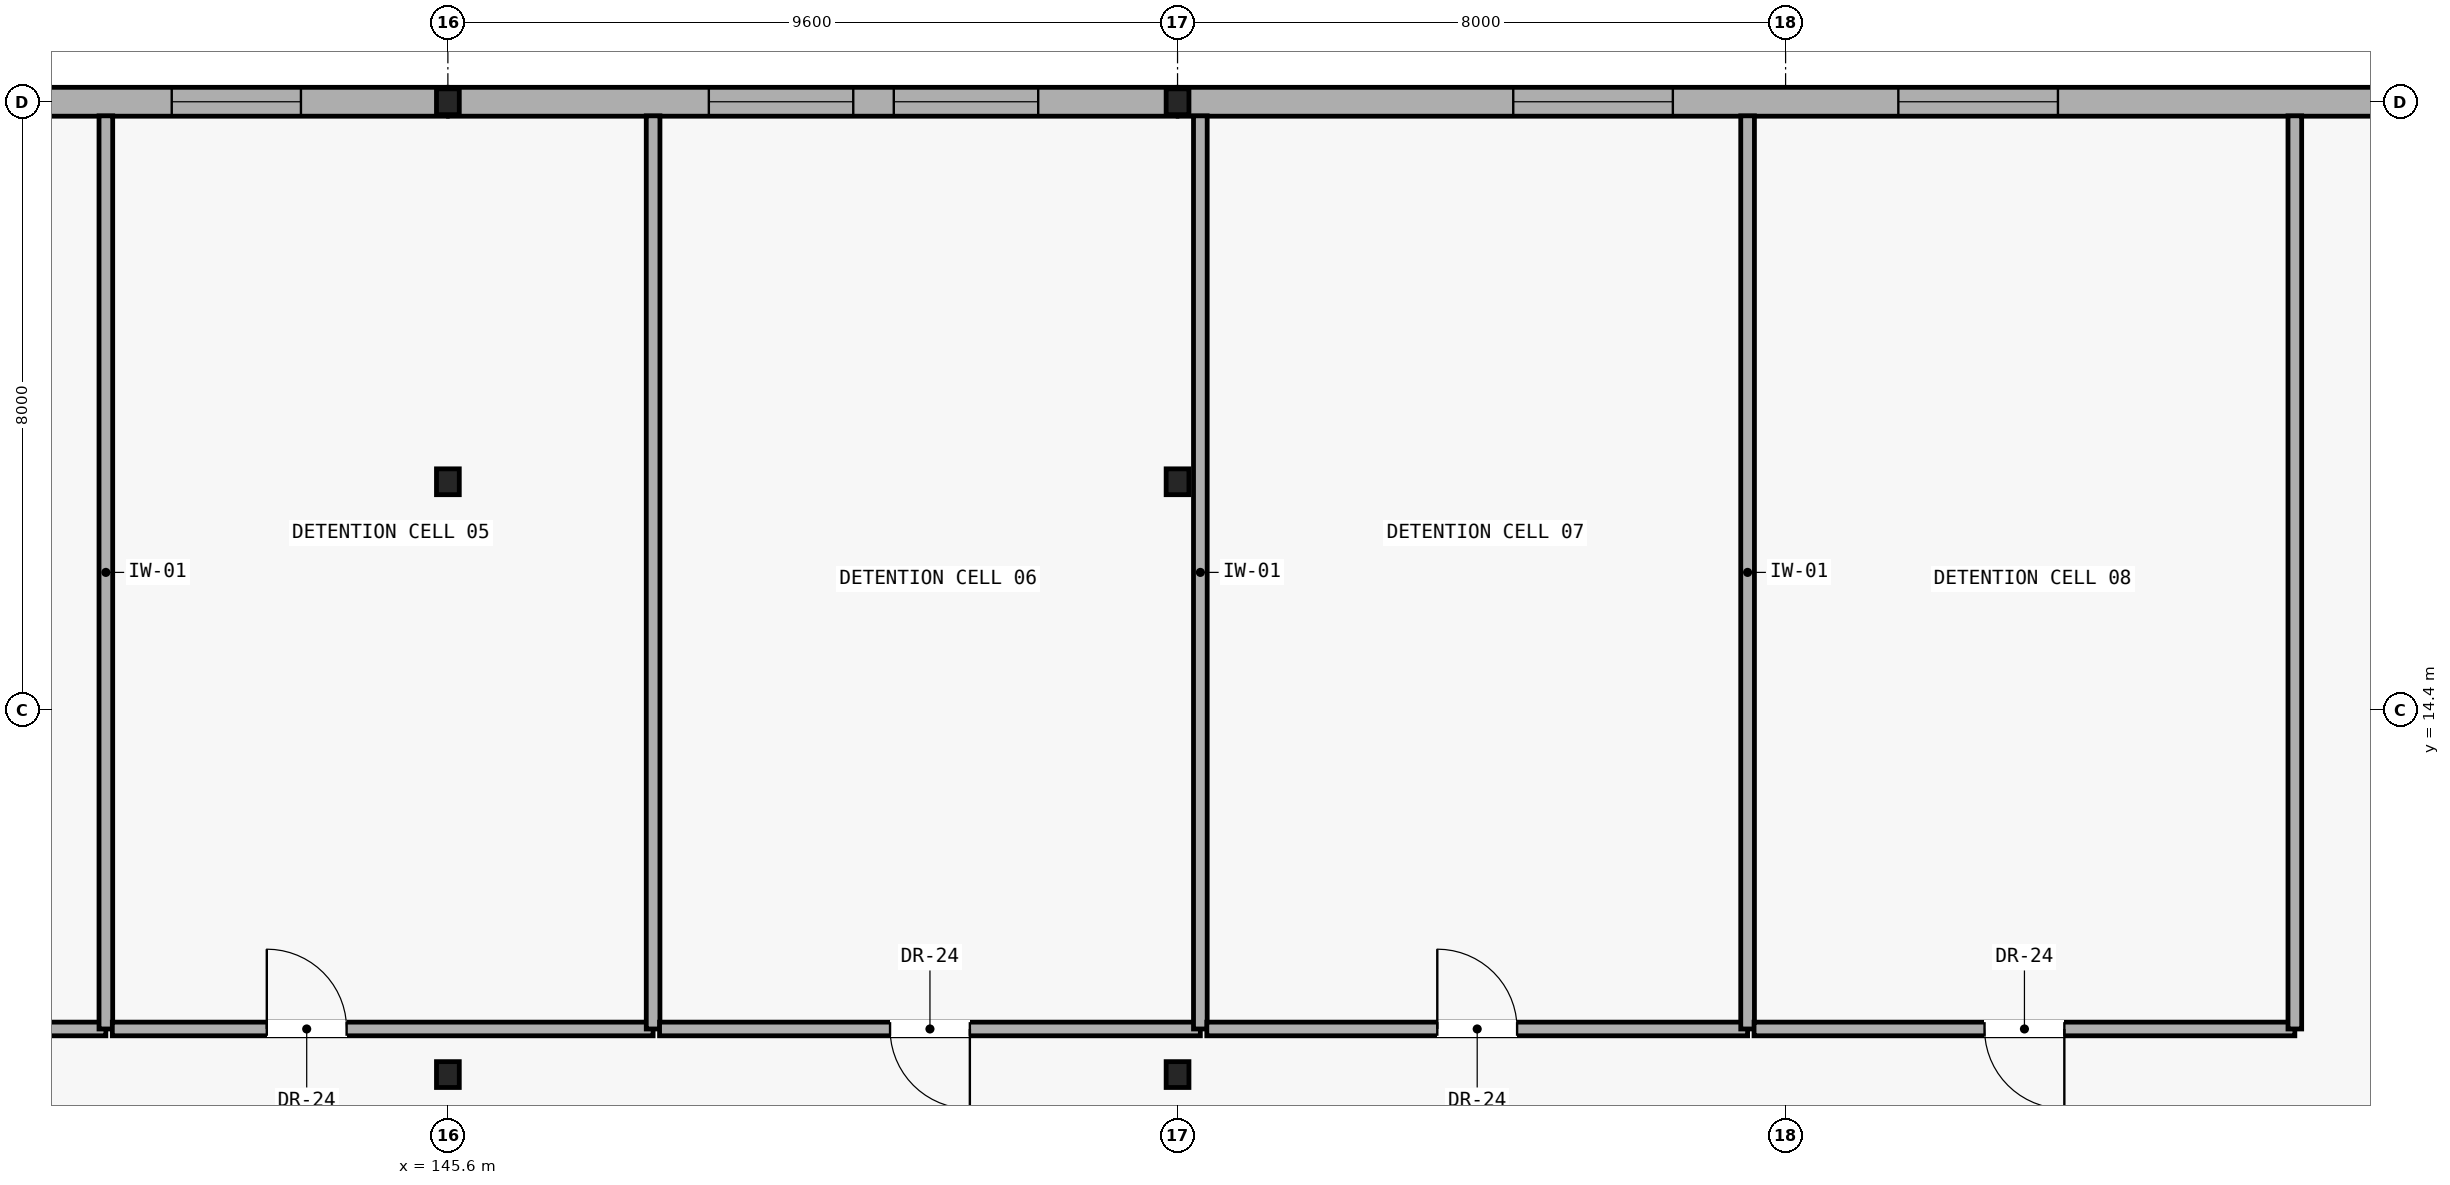
"""IFC4 building model, lengths in metres.
Left out: names, types, materials, properties, quantities, classifications, styles, units other than length and angle.
Written with IfcOpenShell. Run it as: python <this file> out.ifc"""

import sys

from ifc_helpers import new_model, si_unit, direction, frame, frame_2d, origin, origin_2d, place, context, subcontext, project, spatial, rectangle, i_section, extrude, element, fill, save


model = new_model("IFC4")
c1 = context("Model", 3, precision=1e-05, world=origin(), true_north=direction((0.0, 1.0)))
c2 = subcontext(c1, "Body", "Model", "MODEL_VIEW")
j1 = project(units=[si_unit("LENGTHUNIT", "METRE"), si_unit("PLANEANGLEUNIT", "RADIAN")], contexts=[c1])
p1 = place(None, origin())
s1 = spatial("IfcSite", under=j1, at=p1, CompositionType="ELEMENT")
p2 = place(p1, origin())
s2 = spatial("IfcBuilding", under=s1, at=p2, CompositionType="ELEMENT")
p3 = place(p2, frame((0.0, 0.0, 5.25)))
s3 = spatial("IfcBuildingStorey", under=s2, at=p3, CompositionType="ELEMENT", Elevation=5.25)
for number, where, z_axis, x_axis in (
    (1, (145.6, 22.4, 0.0), (0.0, 0.0, 1.0), (1.0, 0.0, 0.0)),
    (2, (145.6, 9.6, 0.0), (0.0, 0.0, 1.0), (1.0, 0.0, 0.0)),
    (3, (145.6, 17.4, 0.0), (0.0, 0.0, 1.0), (1.0, 0.0, 0.0)),
    (4, (155.2, 22.4, 0.0), (0.0, 0.0, 1.0), (1.0, 0.0, 0.0)),
    (5, (155.2, 9.6, 0.0), (0.0, 0.0, 1.0), (1.0, 0.0, 0.0)),
    (6, (155.2, 17.4, 0.0), (0.0, 0.0, 1.0), (1.0, 0.0, 0.0)),
):
    element("IfcColumn", number, at=place(p3, frame(where, z_axis=z_axis, x_axis=x_axis)), inside=s3, PredefinedType="COLUMN", context=c2, shape_type="SweptSolid", body=[
        extrude(i_section(OverallWidth=0.3, OverallDepth=0.34, WebThickness=0.012, FlangeThickness=0.021, FilletRadius=0.027, at=origin_2d()), origin(), (0.0, 0.0, 1.0), 4.2),
    ])
p4 = place(p3, frame((136.008, 22.4, 0.0), z_axis=(0.0, 0.0, 1.0), x_axis=(1.0, 0.0, 0.0)))
e7 = element("IfcWall", 7, at=p4, inside=s3, PredefinedType="SOLIDWALL", context=c2, shape_type="SweptSolid", body=[
    extrude(rectangle(XDim=9.584, YDim=0.38, at=frame_2d((4.792, 0.0))), origin(), (0.0, 0.0, 1.0), 3.635),
])
p5 = place(p4, frame((2.475, 0.0, 1.7)))
e8 = element("IfcOpeningElement", 8, at=p5, cuts=e7, PredefinedType="OPENING", context=c2, shape_type="SweptSolid", body=[
    extrude(rectangle(XDim=1.7, YDim=0.7, at=frame_2d((0.85, 0.35))), frame((0.0, 0.2, 0.0), z_axis=(0.0, -1.0, 0.0), x_axis=(1.0, 0.0, 0.0)), (0.0, 0.0, 1.0), 0.4),
])
p6 = place(p4, frame((5.959, 0.0, 1.7)))
e9 = element("IfcOpeningElement", 9, at=p6, cuts=e7, PredefinedType="OPENING", context=c2, shape_type="SweptSolid", body=[
    extrude(rectangle(XDim=1.7, YDim=0.7, at=frame_2d((0.85, 0.35))), frame((0.0, 0.2, 0.0), z_axis=(0.0, -1.0, 0.0), x_axis=(1.0, 0.0, 0.0)), (0.0, 0.0, 1.0), 0.4),
])
p7 = place(p3, frame((145.608, 22.4, 0.0), z_axis=(0.0, 0.0, 1.0), x_axis=(1.0, 0.0, 0.0)))
e10 = element("IfcWall", 10, at=p7, inside=s3, PredefinedType="SOLIDWALL", context=c2, shape_type="SweptSolid", body=[
    extrude(rectangle(XDim=9.584, YDim=0.38, at=frame_2d((4.792, 0.0))), origin(), (0.0, 0.0, 1.0), 3.635),
])
p8 = place(p7, frame((3.425, 0.0, 1.7)))
e11 = element("IfcOpeningElement", 11, at=p8, cuts=e10, PredefinedType="OPENING", context=c2, shape_type="SweptSolid", body=[
    extrude(rectangle(XDim=1.9, YDim=0.7, at=frame_2d((0.95, 0.35))), frame((0.0, 0.2, 0.0), z_axis=(0.0, -1.0, 0.0), x_axis=(1.0, 0.0, 0.0)), (0.0, 0.0, 1.0), 0.4),
])
p9 = place(p7, frame((5.859, 0.0, 1.7)))
e12 = element("IfcOpeningElement", 12, at=p9, cuts=e10, PredefinedType="OPENING", context=c2, shape_type="SweptSolid", body=[
    extrude(rectangle(XDim=1.9, YDim=0.7, at=frame_2d((0.95, 0.35))), frame((0.0, 0.2, 0.0), z_axis=(0.0, -1.0, 0.0), x_axis=(1.0, 0.0, 0.0)), (0.0, 0.0, 1.0), 0.4),
])
p10 = place(p3, frame((155.208, 22.4, 0.0), z_axis=(0.0, 0.0, 1.0), x_axis=(1.0, 0.0, 0.0)))
e13 = element("IfcWall", 13, at=p10, inside=s3, PredefinedType="SOLIDWALL", context=c2, shape_type="SweptSolid", body=[
    extrude(rectangle(XDim=15.984, YDim=0.38, at=frame_2d((7.992, 0.0))), origin(), (0.0, 0.0, 1.0), 3.405),
])
p11 = place(p10, frame((4.409, 0.0, 1.7)))
e14 = element("IfcOpeningElement", 14, at=p11, cuts=e13, PredefinedType="OPENING", context=c2, shape_type="SweptSolid", body=[
    extrude(rectangle(XDim=2.1, YDim=0.7, at=frame_2d((1.05, 0.35))), frame((0.0, 0.2, 0.0), z_axis=(0.0, -1.0, 0.0), x_axis=(1.0, 0.0, 0.0)), (0.0, 0.0, 1.0), 0.4),
])
p12 = place(p10, frame((9.475, 0.0, 1.7)))
e15 = element("IfcOpeningElement", 15, at=p12, cuts=e13, PredefinedType="OPENING", context=c2, shape_type="SweptSolid", body=[
    extrude(rectangle(XDim=2.1, YDim=0.7, at=frame_2d((1.05, 0.35))), frame((0.0, 0.2, 0.0), z_axis=(0.0, -1.0, 0.0), x_axis=(1.0, 0.0, 0.0)), (0.0, 0.0, 1.0), 0.4),
])
p13 = place(p3, frame((134.2, 10.2, 0.0), z_axis=(0.0, 0.0, 1.0), x_axis=(1.0, 0.0, 0.0)))
e16 = element("IfcWall", 16, at=p13, inside=s3, PredefinedType="PARTITIONING", context=c2, shape_type="SweptSolid", body=[
    extrude(rectangle(XDim=6.9, YDim=0.18, at=frame_2d((3.45, 0.0))), origin(), (0.0, 0.0, 1.0), 3.96),
])
p14 = place(p13, frame((3.175, 0.0, 0.0)))
e17 = element("IfcOpeningElement", 17, at=p14, cuts=e16, PredefinedType="OPENING", context=c2, shape_type="SweptSolid", body=[
    extrude(rectangle(XDim=1.05, YDim=2.1, at=frame_2d((0.525, 1.05))), frame((0.0, 0.1, 0.0), z_axis=(0.0, -1.0, 0.0), x_axis=(1.0, 0.0, 0.0)), (0.0, 0.0, 1.0), 0.2),
])
p15 = place(p3, frame((141.1, 10.2, 0.0), z_axis=(0.0, 0.0, 1.0), x_axis=(0.0, 1.0, 0.0)))
e18 = element("IfcWall", 18, at=p15, inside=s3, PredefinedType="PARTITIONING", context=c2, shape_type="SweptSolid", body=[
    extrude(rectangle(XDim=12.015, YDim=0.18, at=frame_2d((6.008, 0.0))), origin(), (0.0, 0.0, 1.0), 3.96),
])
p16 = place(p3, frame((141.185, 10.2, 0.0), z_axis=(0.0, 0.0, 1.0), x_axis=(1.0, 0.0, 0.0)))
e19 = element("IfcWall", 19, at=p16, inside=s3, PredefinedType="PARTITIONING", context=c2, shape_type="SweptSolid", body=[
    extrude(rectangle(XDim=7.115, YDim=0.18, at=frame_2d((3.558, 0.0))), origin(), (0.0, 0.0, 1.0), 3.96),
])
p17 = place(p16, frame((2.032, 0.0, 0.0)))
e20 = element("IfcOpeningElement", 20, at=p17, cuts=e19, PredefinedType="OPENING", context=c2, shape_type="SweptSolid", body=[
    extrude(rectangle(XDim=1.05, YDim=2.1, at=frame_2d((0.525, 1.05))), frame((0.0, 0.1, 0.0), z_axis=(0.0, -1.0, 0.0), x_axis=(1.0, 0.0, 0.0)), (0.0, 0.0, 1.0), 0.2),
])
p18 = place(p3, frame((148.3, 10.2, 0.0), z_axis=(0.0, 0.0, 1.0), x_axis=(0.0, 1.0, 0.0)))
e21 = element("IfcWall", 21, at=p18, inside=s3, PredefinedType="PARTITIONING", context=c2, shape_type="SweptSolid", body=[
    extrude(rectangle(XDim=12.015, YDim=0.18, at=frame_2d((6.008, 0.0))), origin(), (0.0, 0.0, 1.0), 3.96),
])
p19 = place(p3, frame((148.385, 10.2, 0.0), z_axis=(0.0, 0.0, 1.0), x_axis=(1.0, 0.0, 0.0)))
e22 = element("IfcWall", 22, at=p19, inside=s3, PredefinedType="PARTITIONING", context=c2, shape_type="SweptSolid", body=[
    extrude(rectangle(XDim=7.115, YDim=0.18, at=frame_2d((3.558, 0.0))), origin(), (0.0, 0.0, 1.0), 3.96),
])
p20 = place(p19, frame((3.032, 0.0, 0.0)))
e23 = element("IfcOpeningElement", 23, at=p20, cuts=e22, PredefinedType="OPENING", context=c2, shape_type="SweptSolid", body=[
    extrude(rectangle(XDim=1.05, YDim=2.1, at=frame_2d((0.525, 1.05))), frame((0.0, 0.1, 0.0), z_axis=(0.0, -1.0, 0.0), x_axis=(1.0, 0.0, 0.0)), (0.0, 0.0, 1.0), 0.2),
])
p21 = place(p3, frame((155.5, 10.2, 0.0), z_axis=(0.0, 0.0, 1.0), x_axis=(0.0, 1.0, 0.0)))
e24 = element("IfcWall", 24, at=p21, inside=s3, PredefinedType="PARTITIONING", context=c2, shape_type="SweptSolid", body=[
    extrude(rectangle(XDim=12.015, YDim=0.18, at=frame_2d((6.008, 0.0))), origin(), (0.0, 0.0, 1.0), 3.5),
])
p22 = place(p3, frame((155.585, 10.2, 0.0), z_axis=(0.0, 0.0, 1.0), x_axis=(1.0, 0.0, 0.0)))
e25 = element("IfcWall", 25, at=p22, inside=s3, PredefinedType="PARTITIONING", context=c2, shape_type="SweptSolid", body=[
    extrude(rectangle(XDim=7.115, YDim=0.18, at=frame_2d((3.558, 0.0))), origin(), (0.0, 0.0, 1.0), 3.96),
])
p23 = place(p22, frame((3.032, 0.0, 0.0)))
e26 = element("IfcOpeningElement", 26, at=p23, cuts=e25, PredefinedType="OPENING", context=c2, shape_type="SweptSolid", body=[
    extrude(rectangle(XDim=1.05, YDim=2.1, at=frame_2d((0.525, 1.05))), frame((0.0, 0.1, 0.0), z_axis=(0.0, -1.0, 0.0), x_axis=(1.0, 0.0, 0.0)), (0.0, 0.0, 1.0), 0.2),
])
p24 = place(p3, frame((162.7, 10.2, 0.0), z_axis=(0.0, 0.0, 1.0), x_axis=(0.0, 1.0, 0.0)))
e27 = element("IfcWall", 27, at=p24, inside=s3, PredefinedType="PARTITIONING", context=c2, shape_type="SweptSolid", body=[
    extrude(rectangle(XDim=12.015, YDim=0.18, at=frame_2d((6.008, 0.0))), origin(), (0.0, 0.0, 1.0), 3.96),
])
p25 = place(p3, frame((162.785, 10.2, 0.0), z_axis=(0.0, 0.0, 1.0), x_axis=(1.0, 0.0, 0.0)))
e28 = element("IfcWall", 28, at=p25, inside=s3, PredefinedType="PARTITIONING", context=c2, shape_type="SweptSolid", body=[
    extrude(rectangle(XDim=7.115, YDim=0.18, at=frame_2d((3.558, 0.0))), origin(), (0.0, 0.0, 1.0), 3.96),
])
p26 = place(p25, frame((3.032, 0.0, 0.0)))
e29 = element("IfcOpeningElement", 29, at=p26, cuts=e28, PredefinedType="OPENING", context=c2, shape_type="SweptSolid", body=[
    extrude(rectangle(XDim=1.05, YDim=2.1, at=frame_2d((0.525, 1.05))), frame((0.0, 0.1, 0.0), z_axis=(0.0, -1.0, 0.0), x_axis=(1.0, 0.0, 0.0)), (0.0, 0.0, 1.0), 0.2),
])
p27 = place(p3, frame((169.9, 10.2, 0.0), z_axis=(0.0, 0.0, 1.0), x_axis=(0.0, 1.0, 0.0)))
e30 = element("IfcWall", 30, at=p27, inside=s3, PredefinedType="PARTITIONING", context=c2, shape_type="SweptSolid", body=[
    extrude(rectangle(XDim=12.015, YDim=0.18, at=frame_2d((6.008, 0.0))), origin(), (0.0, 0.0, 1.0), 3.96),
])
p28 = place(p6, origin())
e31 = element("IfcWindow", 31, at=p28, inside=s3, PartitioningType="SINGLE_PANEL", PredefinedType="WINDOW", context=c2, shape_type="SweptSolid", body=[
    extrude(rectangle(XDim=1.7, YDim=0.7, at=frame_2d((0.85, 0.35))), frame((0.0, 0.03, 0.0), z_axis=(0.0, -1.0, 0.0), x_axis=(1.0, 0.0, 0.0)), (0.0, 0.0, 1.0), 0.06),
])
fill(e9, e31)
p29 = place(p8, origin())
e32 = element("IfcWindow", 32, at=p29, inside=s3, PartitioningType="SINGLE_PANEL", PredefinedType="WINDOW", context=c2, shape_type="SweptSolid", body=[
    extrude(rectangle(XDim=1.9, YDim=0.7, at=frame_2d((0.95, 0.35))), frame((0.0, 0.03, 0.0), z_axis=(0.0, -1.0, 0.0), x_axis=(1.0, 0.0, 0.0)), (0.0, 0.0, 1.0), 0.06),
])
fill(e11, e32)
p30 = place(p9, origin())
e33 = element("IfcWindow", 33, at=p30, inside=s3, PartitioningType="SINGLE_PANEL", PredefinedType="WINDOW", context=c2, shape_type="SweptSolid", body=[
    extrude(rectangle(XDim=1.9, YDim=0.7, at=frame_2d((0.95, 0.35))), frame((0.0, 0.03, 0.0), z_axis=(0.0, -1.0, 0.0), x_axis=(1.0, 0.0, 0.0)), (0.0, 0.0, 1.0), 0.06),
])
fill(e12, e33)
p31 = place(p11, origin())
e34 = element("IfcWindow", 34, at=p31, inside=s3, PartitioningType="SINGLE_PANEL", PredefinedType="WINDOW", context=c2, shape_type="SweptSolid", body=[
    extrude(rectangle(XDim=2.1, YDim=0.7, at=frame_2d((1.05, 0.35))), frame((0.0, 0.03, 0.0), z_axis=(0.0, -1.0, 0.0), x_axis=(1.0, 0.0, 0.0)), (0.0, 0.0, 1.0), 0.06),
])
fill(e14, e34)
p32 = place(p12, origin())
e35 = element("IfcWindow", 35, at=p32, inside=s3, PartitioningType="SINGLE_PANEL", PredefinedType="WINDOW", context=c2, shape_type="SweptSolid", body=[
    extrude(rectangle(XDim=2.1, YDim=0.7, at=frame_2d((1.05, 0.35))), frame((0.0, 0.03, 0.0), z_axis=(0.0, -1.0, 0.0), x_axis=(1.0, 0.0, 0.0)), (0.0, 0.0, 1.0), 0.06),
])
fill(e15, e35)
p33 = place(p17, origin())
e36 = element("IfcDoor", 36, at=p33, inside=s3, OperationType="SINGLE_SWING_LEFT", PredefinedType="DOOR", context=c2, shape_type="SweptSolid", body=[
    extrude(rectangle(XDim=1.05, YDim=2.1, at=frame_2d((0.525, 1.05))), frame((0.0, 0.025, 0.0), z_axis=(0.0, -1.0, 0.0), x_axis=(1.0, 0.0, 0.0)), (0.0, 0.0, 1.0), 0.05),
])
fill(e20, e36)
p34 = place(p20, frame((1.05, 0.0, 0.0), z_axis=(0.0, 0.0, 1.0), x_axis=(-1.0, 0.0, 0.0)))
e37 = element("IfcDoor", 37, at=p34, inside=s3, OperationType="SINGLE_SWING_RIGHT", PredefinedType="DOOR", context=c2, shape_type="SweptSolid", body=[
    extrude(rectangle(XDim=1.05, YDim=2.1, at=frame_2d((0.525, 1.05))), frame((0.0, 0.025, 0.0), z_axis=(0.0, -1.0, 0.0), x_axis=(1.0, 0.0, 0.0)), (0.0, 0.0, 1.0), 0.05),
])
fill(e23, e37)
p35 = place(p23, origin())
e38 = element("IfcDoor", 38, at=p35, inside=s3, OperationType="SINGLE_SWING_LEFT", PredefinedType="DOOR", context=c2, shape_type="SweptSolid", body=[
    extrude(rectangle(XDim=1.05, YDim=2.1, at=frame_2d((0.525, 1.05))), frame((0.0, 0.025, 0.0), z_axis=(0.0, -1.0, 0.0), x_axis=(1.0, 0.0, 0.0)), (0.0, 0.0, 1.0), 0.05),
])
fill(e26, e38)
p36 = place(p26, frame((1.05, 0.0, 0.0), z_axis=(0.0, 0.0, 1.0), x_axis=(-1.0, 0.0, 0.0)))
e39 = element("IfcDoor", 39, at=p36, inside=s3, OperationType="SINGLE_SWING_RIGHT", PredefinedType="DOOR", context=c2, shape_type="SweptSolid", body=[
    extrude(rectangle(XDim=1.05, YDim=2.1, at=frame_2d((0.525, 1.05))), frame((0.0, 0.025, 0.0), z_axis=(0.0, -1.0, 0.0), x_axis=(1.0, 0.0, 0.0)), (0.0, 0.0, 1.0), 0.05),
])
fill(e29, e39)
save(model, sys.argv[1])
